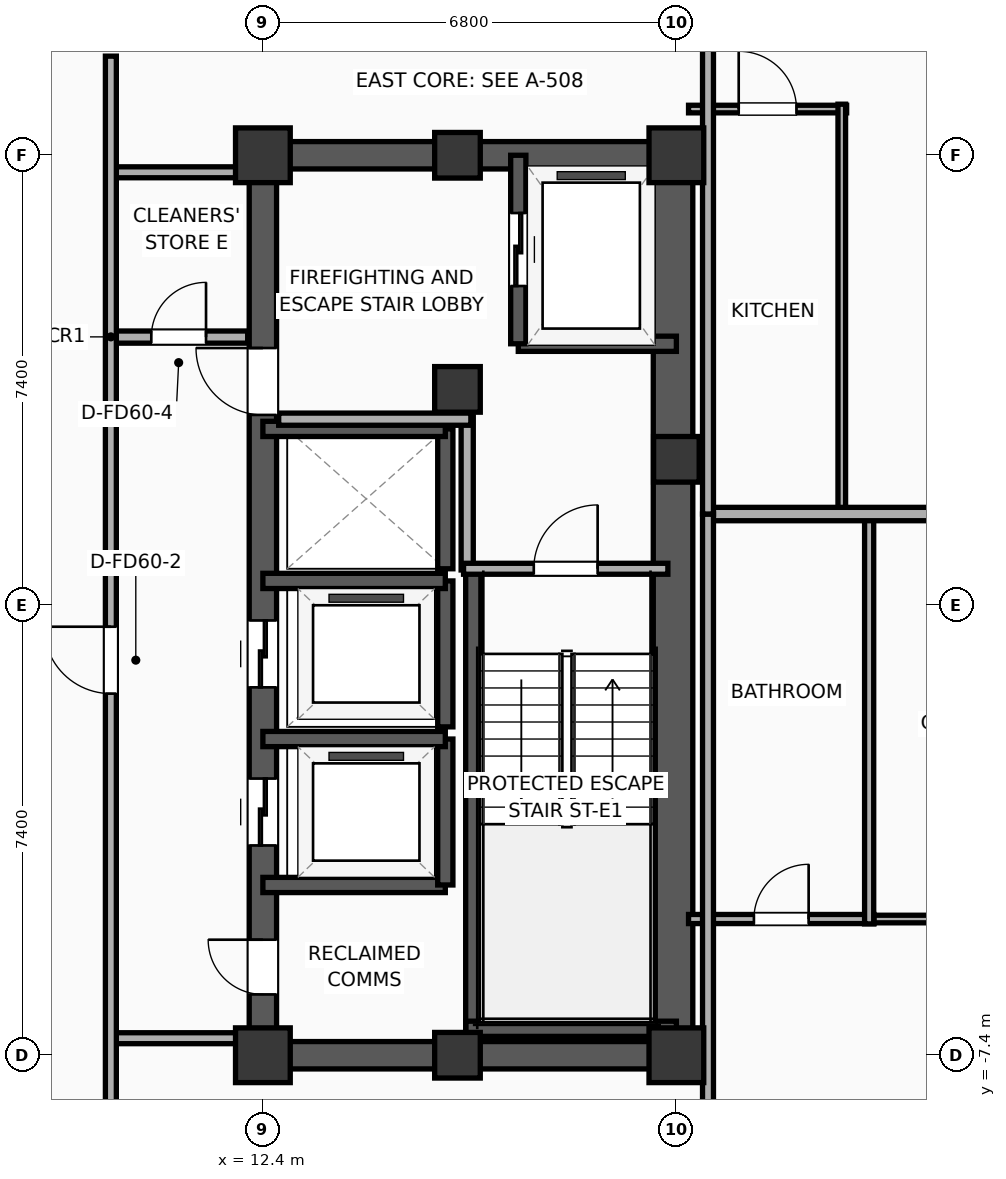
"""IFC4 building model, lengths in metres.
Left out: names, types, materials, properties, quantities, classifications, styles, units other than length and angle.
Written with IfcOpenShell. Run it as: python <this file> out.ifc"""

import sys

from ifc_helpers import new_model, si_unit, direction, frame, frame_2d, origin, origin_2d, place, context, subcontext, project, spatial, rectangle, extrude, element, fill, save


model = new_model("IFC4")
c1 = context("Model", 3, precision=1e-05, world=origin(), true_north=direction((0.0, 1.0)))
c2 = subcontext(c1, "Body", "Model", "MODEL_VIEW")
j1 = project(units=[si_unit("LENGTHUNIT", "METRE"), si_unit("PLANEANGLEUNIT", "RADIAN")], contexts=[c1])
p1 = place(None, origin())
s1 = spatial("IfcSite", under=j1, at=p1, CompositionType="ELEMENT")
p2 = place(p1, origin())
s2 = spatial("IfcBuilding", under=s1, at=p2, CompositionType="ELEMENT")
p3 = place(p2, frame((0.0, 0.0, 156.0)))
s3 = spatial("IfcBuildingStorey", under=s2, at=p3, CompositionType="ELEMENT", Elevation=156.0)
p4 = place(p3, frame((12.4, -7.4, 0.0), z_axis=(0.0, 0.0, 1.0), x_axis=(1.0, 0.0, 0.0)))
e1 = element("IfcColumn", 1, at=p4, inside=s3, PredefinedType="COLUMN", context=c2, shape_type="SweptSolid", body=[
    extrude(rectangle(XDim=0.9, YDim=0.9, at=origin_2d()), origin(), (0.0, 0.0, 1.0), 3.9),
])
p5 = place(p3, frame((15.6, 3.55, 0.0), z_axis=(0.0, 0.0, 1.0), x_axis=(1.0, 0.0, 0.0)))
e2 = element("IfcColumn", 2, at=p5, inside=s3, PredefinedType="COLUMN", context=c2, shape_type="SweptSolid", body=[
    extrude(rectangle(XDim=0.75, YDim=0.75, at=origin_2d()), origin(), (0.0, 0.0, 1.0), 3.9),
])
p6 = place(p3, frame((12.4, 7.4, 0.0), z_axis=(0.0, 0.0, 1.0), x_axis=(1.0, 0.0, 0.0)))
e3 = element("IfcColumn", 3, at=p6, inside=s3, PredefinedType="COLUMN", context=c2, shape_type="SweptSolid", body=[
    extrude(rectangle(XDim=0.9, YDim=0.9, at=origin_2d()), origin(), (0.0, 0.0, 1.0), 3.9),
])
for number, where, z_axis, x_axis in (
    (4, (15.6, -7.4, 0.0), (0.0, 0.0, 1.0), (1.0, 0.0, 0.0)),
    (5, (15.6, 7.4, 0.0), (0.0, 0.0, 1.0), (1.0, 0.0, 0.0)),
):
    element("IfcColumn", number, at=place(p3, frame(where, z_axis=z_axis, x_axis=x_axis)), inside=s3, PredefinedType="COLUMN", context=c2, shape_type="SweptSolid", body=[
        extrude(rectangle(XDim=0.75, YDim=0.75, at=origin_2d()), origin(), (0.0, 0.0, 1.0), 3.9),
    ])
p7 = place(p3, frame((19.2, -7.4, 0.0), z_axis=(0.0, 0.0, 1.0), x_axis=(1.0, 0.0, 0.0)))
e6 = element("IfcColumn", 6, at=p7, inside=s3, PredefinedType="COLUMN", context=c2, shape_type="SweptSolid", body=[
    extrude(rectangle(XDim=0.9, YDim=0.9, at=origin_2d()), origin(), (0.0, 0.0, 1.0), 3.9),
])
p8 = place(p3, frame((19.2, 2.4, 0.0), z_axis=(0.0, 0.0, 1.0), x_axis=(1.0, 0.0, 0.0)))
e7 = element("IfcColumn", 7, at=p8, inside=s3, PredefinedType="COLUMN", context=c2, shape_type="SweptSolid", body=[
    extrude(rectangle(XDim=0.75, YDim=0.75, at=origin_2d()), origin(), (0.0, 0.0, 1.0), 3.9),
])
p9 = place(p3, frame((19.2, 7.4, 0.0), z_axis=(0.0, 0.0, 1.0), x_axis=(1.0, 0.0, 0.0)))
e8 = element("IfcColumn", 8, at=p9, inside=s3, PredefinedType="COLUMN", context=c2, shape_type="SweptSolid", body=[
    extrude(rectangle(XDim=0.9, YDim=0.9, at=origin_2d()), origin(), (0.0, 0.0, 1.0), 3.9),
])
for number, where, z_axis, x_axis in (
    (9, (12.175, -7.4, 0.0), (0.0, 0.0, 1.0), (1.0, 0.0, 0.0)),
    (10, (12.175, 7.4, 0.0), (0.0, 0.0, 1.0), (1.0, 0.0, 0.0)),
):
    element("IfcWall", number, at=place(p3, frame(where, z_axis=z_axis, x_axis=x_axis)), inside=s3, PredefinedType="SHEAR", context=c2, shape_type="SweptSolid", body=[
        extrude(rectangle(XDim=7.25, YDim=0.45, at=frame_2d((3.625, 0.0))), origin(), (0.0, 0.0, 1.0), 3.65),
    ])
p10 = place(p3, frame((12.4, -7.4, 0.0), z_axis=(0.0, 0.0, 1.0), x_axis=(0.0, 1.0, 0.0)))
e11 = element("IfcWall", 11, at=p10, inside=s3, PredefinedType="SHEAR", context=c2, shape_type="SweptSolid", body=[
    extrude(rectangle(XDim=14.8, YDim=0.45, at=frame_2d((7.4, 0.0))), origin(), (0.0, 0.0, 1.0), 3.65),
])
p11 = place(p10, frame((3.45, 0.0, 0.0)))
e12 = element("IfcOpeningElement", 12, at=p11, cuts=e11, PredefinedType="OPENING", context=c2, shape_type="SweptSolid", body=[
    extrude(rectangle(XDim=1.1, YDim=2.05, at=frame_2d((0.55, 1.025))), frame((0.0, 0.235, 0.0), z_axis=(0.0, -1.0, 0.0), x_axis=(1.0, 0.0, 0.0)), (0.0, 0.0, 1.0), 0.47),
])
p12 = place(p10, frame((6.05, 0.0, 0.0)))
e13 = element("IfcOpeningElement", 13, at=p12, cuts=e11, PredefinedType="OPENING", context=c2, shape_type="SweptSolid", body=[
    extrude(rectangle(XDim=1.1, YDim=2.05, at=frame_2d((0.55, 1.025))), frame((0.0, 0.235, 0.0), z_axis=(0.0, -1.0, 0.0), x_axis=(1.0, 0.0, 0.0)), (0.0, 0.0, 1.0), 0.47),
])
p13 = place(p10, frame((10.53, 0.0, 0.0)))
e14 = element("IfcOpeningElement", 14, at=p13, cuts=e11, PredefinedType="OPENING", context=c2, shape_type="SweptSolid", body=[
    extrude(rectangle(XDim=1.1, YDim=2.05, at=frame_2d((0.55, 1.025))), frame((0.0, 0.235, 0.0), z_axis=(0.0, -1.0, 0.0), x_axis=(1.0, 0.0, 0.0)), (0.0, 0.0, 1.0), 0.47),
])
p14 = place(p10, frame((1.0, 0.0, 0.0)))
e15 = element("IfcOpeningElement", 15, at=p14, cuts=e11, PredefinedType="OPENING", context=c2, shape_type="SweptSolid", body=[
    extrude(rectangle(XDim=0.9, YDim=2.05, at=frame_2d((0.45, 1.025))), frame((0.0, 0.235, 0.0), z_axis=(0.0, -1.0, 0.0), x_axis=(1.0, 0.0, 0.0)), (0.0, 0.0, 1.0), 0.47),
])
p15 = place(p3, frame((19.145, -7.4, 0.0), z_axis=(0.0, 0.0, 1.0), x_axis=(0.0, 1.0, 0.0)))
e16 = element("IfcWall", 16, at=p15, inside=s3, PredefinedType="SHEAR", context=c2, shape_type="SweptSolid", body=[
    extrude(rectangle(XDim=14.8, YDim=0.65, at=frame_2d((7.4, 0.0))), origin(), (0.0, 0.0, 1.0), 3.65),
])
p16 = place(p3, frame((15.86, -7.085, 0.0), z_axis=(0.0, 0.0, 1.0), x_axis=(0.0, 1.0, 0.0)))
e17 = element("IfcWall", 17, at=p16, inside=s3, PredefinedType="SOLIDWALL", context=c2, shape_type="SweptSolid", body=[
    extrude(rectangle(XDim=7.685, YDim=0.25, at=frame_2d((3.843, 0.0))), origin(), (0.0, 0.0, 1.0), 3.65),
])
p17 = place(p3, frame((15.74, -6.965, 0.0), z_axis=(0.0, 0.0, 1.0), x_axis=(1.0, 0.0, 0.0)))
e18 = element("IfcWall", 18, at=p17, inside=s3, PredefinedType="SOLIDWALL", context=c2, shape_type="SweptSolid", body=[
    extrude(rectangle(XDim=3.46, YDim=0.25, at=frame_2d((1.73, 0.0))), origin(), (0.0, 0.0, 1.0), 3.65),
])
p18 = place(p3, frame((16.6, 4.3, 0.0), z_axis=(0.0, 0.0, 1.0), x_axis=(1.0, 0.0, 0.0)))
e19 = element("IfcWall", 19, at=p18, inside=s3, PredefinedType="SOLIDWALL", context=c2, shape_type="SweptSolid", body=[
    extrude(rectangle(XDim=2.6, YDim=0.25, at=frame_2d((1.3, 0.0))), origin(), (0.0, 0.0, 1.0), 3.65),
])
p19 = place(p3, frame((16.6, 7.4, 0.0), z_axis=(0.0, 0.0, 1.0), x_axis=(0.0, -1.0, 0.0)))
e20 = element("IfcWall", 20, at=p19, inside=s3, PredefinedType="SOLIDWALL", context=c2, shape_type="SweptSolid", body=[
    extrude(rectangle(XDim=3.1, YDim=0.25, at=frame_2d((1.55, 0.0))), origin(), (0.0, 0.0, 1.0), 3.65),
])
p20 = place(p19, frame((0.95, 0.0, 0.0)))
e21 = element("IfcOpeningElement", 21, at=p20, cuts=e20, PredefinedType="OPENING", context=c2, shape_type="SweptSolid", body=[
    extrude(rectangle(XDim=1.2, YDim=2.05, at=frame_2d((0.6, 1.025))), frame((0.0, 0.135, 0.0), z_axis=(0.0, -1.0, 0.0), x_axis=(1.0, 0.0, 0.0)), (0.0, 0.0, 1.0), 0.27),
])
p21 = place(p3, frame((12.4, -4.6, 0.0), z_axis=(0.0, 0.0, 1.0), x_axis=(1.0, 0.0, 0.0)))
e22 = element("IfcWall", 22, at=p21, inside=s3, PredefinedType="SOLIDWALL", context=c2, shape_type="SweptSolid", body=[
    extrude(rectangle(XDim=3.0, YDim=0.25, at=frame_2d((1.5, 0.0))), origin(), (0.0, 0.0, 1.0), 3.65),
])
p22 = place(p3, frame((15.4, -4.6, 0.0), z_axis=(0.0, 0.0, 1.0), x_axis=(0.0, 1.0, 0.0)))
e23 = element("IfcWall", 23, at=p22, inside=s3, PredefinedType="SOLIDWALL", context=c2, shape_type="SweptSolid", body=[
    extrude(rectangle(XDim=2.4, YDim=0.25, at=frame_2d((1.2, 0.0))), origin(), (0.0, 0.0, 1.0), 3.65),
])
p23 = place(p3, frame((15.4, -2.2, 0.0), z_axis=(0.0, 0.0, 1.0), x_axis=(-1.0, 0.0, 0.0)))
e24 = element("IfcWall", 24, at=p23, inside=s3, PredefinedType="SOLIDWALL", context=c2, shape_type="SweptSolid", body=[
    extrude(rectangle(XDim=3.0, YDim=0.25, at=frame_2d((1.5, 0.0))), origin(), (0.0, 0.0, 1.0), 3.65),
])
p24 = place(p3, frame((15.4, -2.0, 0.0), z_axis=(0.0, 0.0, 1.0), x_axis=(0.0, 1.0, 0.0)))
e25 = element("IfcWall", 25, at=p24, inside=s3, PredefinedType="SOLIDWALL", context=c2, shape_type="SweptSolid", body=[
    extrude(rectangle(XDim=2.4, YDim=0.25, at=frame_2d((1.2, 0.0))), origin(), (0.0, 0.0, 1.0), 3.65),
])
p25 = place(p3, frame((15.4, 0.4, 0.0), z_axis=(0.0, 0.0, 1.0), x_axis=(-1.0, 0.0, 0.0)))
e26 = element("IfcWall", 26, at=p25, inside=s3, PredefinedType="SOLIDWALL", context=c2, shape_type="SweptSolid", body=[
    extrude(rectangle(XDim=3.0, YDim=0.25, at=frame_2d((1.5, 0.0))), origin(), (0.0, 0.0, 1.0), 3.65),
])
p26 = place(p3, frame((15.4, 0.6, 0.0), z_axis=(0.0, 0.0, 1.0), x_axis=(0.0, 1.0, 0.0)))
e27 = element("IfcWall", 27, at=p26, inside=s3, PredefinedType="SOLIDWALL", context=c2, shape_type="SweptSolid", body=[
    extrude(rectangle(XDim=2.3, YDim=0.25, at=frame_2d((1.15, 0.0))), origin(), (0.0, 0.0, 1.0), 3.65),
])
p27 = place(p3, frame((15.4, 2.9, 0.0), z_axis=(0.0, 0.0, 1.0), x_axis=(-1.0, 0.0, 0.0)))
e28 = element("IfcWall", 28, at=p27, inside=s3, PredefinedType="SOLIDWALL", context=c2, shape_type="SweptSolid", body=[
    extrude(rectangle(XDim=3.0, YDim=0.25, at=frame_2d((1.5, 0.0))), origin(), (0.0, 0.0, 1.0), 3.65),
])
p28 = place(p3, frame((15.76, 0.58, 0.0), z_axis=(0.0, 0.0, 1.0), x_axis=(0.0, 1.0, 0.0)))
e29 = element("IfcWall", 29, at=p28, inside=s3, PredefinedType="PARTITIONING", context=c2, shape_type="SweptSolid", body=[
    extrude(rectangle(XDim=2.52, YDim=0.2, at=frame_2d((1.26, 0.0))), origin(), (0.0, 0.0, 1.0), 3.65),
])
p29 = place(p3, frame((12.66, 3.06, 0.0), z_axis=(0.0, 0.0, 1.0), x_axis=(1.0, 0.0, 0.0)))
e30 = element("IfcWall", 30, at=p29, inside=s3, PredefinedType="PARTITIONING", context=c2, shape_type="SweptSolid", body=[
    extrude(rectangle(XDim=3.16, YDim=0.2, at=frame_2d((1.58, 0.0))), origin(), (0.0, 0.0, 1.0), 3.65),
])
p30 = place(p3, frame((15.7, 0.6, 0.0), z_axis=(0.0, 0.0, 1.0), x_axis=(1.0, 0.0, 0.0)))
e31 = element("IfcWall", 31, at=p30, inside=s3, PredefinedType="PARTITIONING", context=c2, shape_type="SweptSolid", body=[
    extrude(rectangle(XDim=3.36, YDim=0.18, at=frame_2d((1.68, 0.0))), origin(), (0.0, 0.0, 1.0), 3.65),
])
p31 = place(p30, frame((1.155, 0.0, 0.0)))
e32 = element("IfcOpeningElement", 32, at=p31, cuts=e31, PredefinedType="OPENING", context=c2, shape_type="SweptSolid", body=[
    extrude(rectangle(XDim=1.05, YDim=2.05, at=frame_2d((0.525, 1.025))), frame((0.0, 0.1, 0.0), z_axis=(0.0, -1.0, 0.0), x_axis=(1.0, 0.0, 0.0)), (0.0, 0.0, 1.0), 0.2),
])
p32 = place(p3, frame((9.88, 4.41, 0.0), z_axis=(0.0, 0.0, 1.0), x_axis=(1.0, 0.0, 0.0)))
e33 = element("IfcWall", 33, at=p32, inside=s3, PredefinedType="PARTITIONING", context=c2, shape_type="SweptSolid", body=[
    extrude(rectangle(XDim=2.27, YDim=0.2, at=frame_2d((1.135, 0.0))), origin(), (0.0, 0.0, 1.0), 3.65),
])
p33 = place(p32, frame((0.685, 0.0, 0.0)))
e34 = element("IfcOpeningElement", 34, at=p33, cuts=e33, PredefinedType="OPENING", context=c2, shape_type="SweptSolid", body=[
    extrude(rectangle(XDim=0.9, YDim=2.05, at=frame_2d((0.45, 1.025))), frame((0.0, 0.11, 0.0), z_axis=(0.0, -1.0, 0.0), x_axis=(1.0, 0.0, 0.0)), (0.0, 0.0, 1.0), 0.22),
])
for number, where, z_axis, x_axis in (
    (35, (9.88, 7.12, 0.0), (0.0, 0.0, 1.0), (1.0, 0.0, 0.0)),
    (36, (9.88, -7.12, 0.0), (0.0, 0.0, 1.0), (1.0, 0.0, 0.0)),
):
    element("IfcWall", number, at=place(p3, frame(where, z_axis=z_axis, x_axis=x_axis)), inside=s3, PredefinedType="PARTITIONING", context=c2, shape_type="SweptSolid", body=[
        extrude(rectangle(XDim=2.27, YDim=0.18, at=frame_2d((1.135, 0.0))), origin(), (0.0, 0.0, 1.0), 3.65),
    ])
p34 = place(p3, frame((9.9, -9.03, 0.0), z_axis=(0.0, 0.0, 1.0), x_axis=(0.0, 1.0, 0.0)))
e37 = element("IfcWall", 37, at=p34, inside=s3, PredefinedType="PARTITIONING", context=c2, shape_type="SweptSolid", body=[
    extrude(rectangle(XDim=18.06, YDim=0.18, at=frame_2d((9.03, 0.0))), origin(), (0.0, 0.0, 1.0), 3.65),
])
p35 = place(p34, frame((7.577, 0.0, 0.0)))
e38 = element("IfcOpeningElement", 38, at=p35, cuts=e37, PredefinedType="OPENING", context=c2, shape_type="SweptSolid", body=[
    extrude(rectangle(XDim=1.1, YDim=2.05, at=frame_2d((0.55, 1.025))), frame((0.0, 0.1, 0.0), z_axis=(0.0, -1.0, 0.0), x_axis=(1.0, 0.0, 0.0)), (0.0, 0.0, 1.0), 0.2),
])
p36 = place(p3, frame((22.31, -5.16, 0.0), z_axis=(0.0, 0.0, 1.0), x_axis=(1.0, 0.0, 0.0)))
e39 = element("IfcWall", 39, at=p36, inside=s3, PredefinedType="PARTITIONING", context=c2, shape_type="SweptSolid", body=[
    extrude(rectangle(XDim=4.913, YDim=0.125, at=frame_2d((2.457, 0.0))), origin(), (0.0, 0.0, 1.0), 3.04),
])
p37 = place(p36, frame((1.761, 0.0, 0.0)))
e40 = element("IfcOpeningElement", 40, at=p37, cuts=e39, PredefinedType="OPENING", context=c2, shape_type="SweptSolid", body=[
    extrude(rectangle(XDim=0.9, YDim=2.05, at=frame_2d((0.45, 1.025))), frame((0.0, 0.073, 0.0), z_axis=(0.0, -1.0, 0.0), x_axis=(1.0, 0.0, 0.0)), (0.0, 0.0, 1.0), 0.145),
])
p38 = place(p3, frame((19.4, -5.16, 0.0), z_axis=(0.0, 0.0, 1.0), x_axis=(1.0, 0.0, 0.0)))
e41 = element("IfcWall", 41, at=p38, inside=s3, PredefinedType="PLUMBINGWALL", context=c2, shape_type="SweptSolid", body=[
    extrude(rectangle(XDim=3.05, YDim=0.15, at=frame_2d((1.525, 0.0))), origin(), (0.0, 0.0, 1.0), 3.65),
])
p39 = place(p38, frame((1.075, 0.0, 0.0)))
e42 = element("IfcOpeningElement", 42, at=p39, cuts=e41, PredefinedType="OPENING", context=c2, shape_type="SweptSolid", body=[
    extrude(rectangle(XDim=0.9, YDim=2.05, at=frame_2d((0.45, 1.025))), frame((0.0, 0.085, 0.0), z_axis=(0.0, -1.0, 0.0), x_axis=(1.0, 0.0, 0.0)), (0.0, 0.0, 1.0), 0.17),
])
p40 = place(p3, frame((22.37, -5.24, 0.0), z_axis=(0.0, 0.0, 1.0), x_axis=(0.0, 1.0, 0.0)))
e43 = element("IfcWall", 43, at=p40, inside=s3, PredefinedType="PLUMBINGWALL", context=c2, shape_type="SweptSolid", body=[
    extrude(rectangle(XDim=6.72, YDim=0.15, at=frame_2d((3.36, 0.0))), origin(), (0.0, 0.0, 1.0), 3.65),
])
p41 = place(p3, frame((19.4, 8.16, 0.0), z_axis=(0.0, 0.0, 1.0), x_axis=(1.0, 0.0, 0.0)))
e44 = element("IfcWall", 44, at=p41, inside=s3, PredefinedType="PARTITIONING", context=c2, shape_type="SweptSolid", body=[
    extrude(rectangle(XDim=2.6, YDim=0.125, at=frame_2d((1.3, 0.0))), origin(), (0.0, 0.0, 1.0), 3.04),
])
p42 = place(p41, frame((0.825, 0.0, 0.0)))
e45 = element("IfcOpeningElement", 45, at=p42, cuts=e44, PredefinedType="OPENING", context=c2, shape_type="SweptSolid", body=[
    extrude(rectangle(XDim=0.95, YDim=2.05, at=frame_2d((0.475, 1.025))), frame((0.0, 0.073, 0.0), z_axis=(0.0, -1.0, 0.0), x_axis=(1.0, 0.0, 0.0)), (0.0, 0.0, 1.0), 0.145),
])
p43 = place(p3, frame((21.92, 1.52, 0.0), z_axis=(0.0, 0.0, 1.0), x_axis=(0.0, 1.0, 0.0)))
e46 = element("IfcWall", 46, at=p43, inside=s3, PredefinedType="PARTITIONING", context=c2, shape_type="SweptSolid", body=[
    extrude(rectangle(XDim=6.72, YDim=0.125, at=frame_2d((3.36, 0.0))), origin(), (0.0, 0.0, 1.0), 3.65),
])
p44 = place(p3, frame((19.72, 1.5, 0.0), z_axis=(0.0, 0.0, 1.0), x_axis=(1.0, 0.0, 0.0)))
e47 = element("IfcWall", 47, at=p44, inside=s3, PredefinedType="PARTITIONING", context=c2, shape_type="SweptSolid", body=[
    extrude(rectangle(XDim=6.653, YDim=0.22, at=frame_2d((3.326, 0.0))), origin(), (0.0, 0.0, 1.0), 3.65),
])
p45 = place(p3, frame((19.72, -18.532, 0.0), z_axis=(0.0, 0.0, 1.0), x_axis=(0.0, 1.0, 0.0)))
e48 = element("IfcWall", 48, at=p45, inside=s3, PredefinedType="PARTITIONING", context=c2, shape_type="SweptSolid", body=[
    extrude(rectangle(XDim=20.032, YDim=0.18, at=frame_2d((10.016, 0.0))), origin(), (0.0, 0.0, 1.0), 3.65),
])
p46 = place(p45, frame((8.402, 0.0, 0.0)))
e49 = element("IfcOpeningElement", 49, at=p46, cuts=e48, PredefinedType="OPENING", context=c2, shape_type="SweptSolid", body=[
    extrude(rectangle(XDim=0.9, YDim=2.05, at=frame_2d((0.45, 1.025))), frame((0.0, 0.1, 0.0), z_axis=(0.0, -1.0, 0.0), x_axis=(1.0, 0.0, 0.0)), (0.0, 0.0, 1.0), 0.2),
])
p47 = place(p3, frame((19.72, 1.5, 0.0), z_axis=(0.0, 0.0, 1.0), x_axis=(0.0, 1.0, 0.0)))
e50 = element("IfcWall", 50, at=p47, inside=s3, PredefinedType="PARTITIONING", context=c2, shape_type="SweptSolid", body=[
    extrude(rectangle(XDim=20.65, YDim=0.18, at=frame_2d((10.325, 0.0))), origin(), (0.0, 0.0, 1.0), 3.04),
])
p48 = place(p47, frame((7.729, 0.0, 0.0)))
e51 = element("IfcOpeningElement", 51, at=p48, cuts=e50, PredefinedType="OPENING", context=c2, shape_type="SweptSolid", body=[
    extrude(rectangle(XDim=0.9, YDim=2.05, at=frame_2d((0.45, 1.025))), frame((0.0, 0.1, 0.0), z_axis=(0.0, -1.0, 0.0), x_axis=(1.0, 0.0, 0.0)), (0.0, 0.0, 1.0), 0.2),
])
p49 = place(p20, origin())
e52 = element("IfcDoor", 52, at=p49, inside=s3, OperationType="SLIDING_TO_LEFT", PredefinedType="DOOR", context=c2, shape_type="SweptSolid", body=[
    extrude(rectangle(XDim=1.2, YDim=2.05, at=frame_2d((0.6, 1.025))), frame((0.0, 0.025, 0.0), z_axis=(0.0, -1.0, 0.0), x_axis=(1.0, 0.0, 0.0)), (0.0, 0.0, 1.0), 0.05),
])
fill(e21, e52)
p50 = place(p11, origin())
e53 = element("IfcDoor", 53, at=p50, inside=s3, OperationType="SLIDING_TO_LEFT", PredefinedType="DOOR", context=c2, shape_type="SweptSolid", body=[
    extrude(rectangle(XDim=1.1, YDim=2.05, at=frame_2d((0.55, 1.025))), frame((0.0, 0.025, 0.0), z_axis=(0.0, -1.0, 0.0), x_axis=(1.0, 0.0, 0.0)), (0.0, 0.0, 1.0), 0.05),
])
fill(e12, e53)
p51 = place(p12, origin())
e54 = element("IfcDoor", 54, at=p51, inside=s3, OperationType="SLIDING_TO_LEFT", PredefinedType="DOOR", context=c2, shape_type="SweptSolid", body=[
    extrude(rectangle(XDim=1.1, YDim=2.05, at=frame_2d((0.55, 1.025))), frame((0.0, 0.025, 0.0), z_axis=(0.0, -1.0, 0.0), x_axis=(1.0, 0.0, 0.0)), (0.0, 0.0, 1.0), 0.05),
])
fill(e13, e54)
p52 = place(p31, origin())
e55 = element("IfcDoor", 55, at=p52, inside=s3, OperationType="SINGLE_SWING_RIGHT", PredefinedType="DOOR", context=c2, shape_type="SweptSolid", body=[
    extrude(rectangle(XDim=1.05, YDim=2.05, at=frame_2d((0.525, 1.025))), frame((0.0, 0.025, 0.0), z_axis=(0.0, -1.0, 0.0), x_axis=(1.0, 0.0, 0.0)), (0.0, 0.0, 1.0), 0.05),
])
fill(e32, e55)
p53 = place(p33, origin())
e56 = element("IfcDoor", 56, at=p53, inside=s3, OperationType="SINGLE_SWING_RIGHT", PredefinedType="DOOR", context=c2, shape_type="SweptSolid", body=[
    extrude(rectangle(XDim=0.9, YDim=2.05, at=frame_2d((0.45, 1.025))), frame((0.0, 0.025, 0.0), z_axis=(0.0, -1.0, 0.0), x_axis=(1.0, 0.0, 0.0)), (0.0, 0.0, 1.0), 0.05),
])
fill(e34, e56)
p54 = place(p35, origin())
e57 = element("IfcDoor", 57, at=p54, inside=s3, OperationType="SINGLE_SWING_RIGHT", PredefinedType="DOOR", context=c2, shape_type="SweptSolid", body=[
    extrude(rectangle(XDim=1.1, YDim=2.05, at=frame_2d((0.55, 1.025))), frame((0.0, 0.025, 0.0), z_axis=(0.0, -1.0, 0.0), x_axis=(1.0, 0.0, 0.0)), (0.0, 0.0, 1.0), 0.05),
])
fill(e38, e57)
p55 = place(p39, origin())
e58 = element("IfcDoor", 58, at=p55, inside=s3, OperationType="SINGLE_SWING_RIGHT", PredefinedType="DOOR", context=c2, shape_type="SweptSolid", body=[
    extrude(rectangle(XDim=0.9, YDim=2.05, at=frame_2d((0.45, 1.025))), frame((0.0, 0.025, 0.0), z_axis=(0.0, -1.0, 0.0), x_axis=(1.0, 0.0, 0.0)), (0.0, 0.0, 1.0), 0.05),
])
fill(e42, e58)
p56 = place(p42, origin())
e59 = element("IfcDoor", 59, at=p56, inside=s3, OperationType="SINGLE_SWING_LEFT", PredefinedType="DOOR", context=c2, shape_type="SweptSolid", body=[
    extrude(rectangle(XDim=0.95, YDim=2.05, at=frame_2d((0.475, 1.025))), frame((0.0, 0.025, 0.0), z_axis=(0.0, -1.0, 0.0), x_axis=(1.0, 0.0, 0.0)), (0.0, 0.0, 1.0), 0.05),
])
fill(e45, e59)
p57 = place(p13, origin())
e60 = element("IfcDoor", 60, at=p57, inside=s3, OperationType="SINGLE_SWING_RIGHT", PredefinedType="DOOR", context=c2, shape_type="SweptSolid", body=[
    extrude(rectangle(XDim=1.1, YDim=2.05, at=frame_2d((0.55, 1.025))), frame((0.0, 0.025, 0.0), z_axis=(0.0, -1.0, 0.0), x_axis=(1.0, 0.0, 0.0)), (0.0, 0.0, 1.0), 0.05),
])
fill(e14, e60)
p58 = place(p14, origin())
e61 = element("IfcDoor", 61, at=p58, inside=s3, OperationType="SINGLE_SWING_RIGHT", PredefinedType="DOOR", context=c2, shape_type="SweptSolid", body=[
    extrude(rectangle(XDim=0.9, YDim=2.05, at=frame_2d((0.45, 1.025))), frame((0.0, 0.025, 0.0), z_axis=(0.0, -1.0, 0.0), x_axis=(1.0, 0.0, 0.0)), (0.0, 0.0, 1.0), 0.05),
])
fill(e15, e61)
save(model, sys.argv[1])
